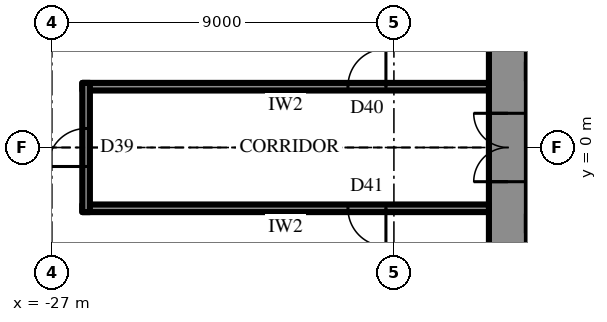
"""IFC4 building model, lengths in metres.
Left out: names, types, materials, properties, quantities, classifications, styles, units other than length and angle.
Written with IfcOpenShell. Run it as: python <this file> out.ifc"""

import sys

from ifc_helpers import new_model, si_unit, direction, frame, frame_2d, origin, place, context, subcontext, project, spatial, rectangle, extrude, element, fill, save


model = new_model("IFC4")
c1 = context("Model", 3, precision=1e-05, world=origin(), true_north=direction((0.0, 1.0)))
c2 = subcontext(c1, "Body", "Model", "MODEL_VIEW")
j1 = project(units=[si_unit("LENGTHUNIT", "METRE"), si_unit("PLANEANGLEUNIT", "RADIAN")], contexts=[c1])
p1 = place(None, origin())
s1 = spatial("IfcSite", under=j1, at=p1, CompositionType="ELEMENT")
p2 = place(p1, origin())
s2 = spatial("IfcBuilding", under=s1, at=p2, CompositionType="ELEMENT")
p3 = place(p2, frame((0.0, 0.0, 295.3)))
s3 = spatial("IfcBuildingStorey", under=s2, at=p3, CompositionType="ELEMENT", Elevation=295.3)
p4 = place(p3, frame((-15.0, 10.7, 0.0), z_axis=(0.0, 0.0, 1.0), x_axis=(0.0, -1.0, 0.0)))
e1 = element("IfcWall", 1, at=p4, inside=s3, PredefinedType="SHEAR", context=c2, shape_type="SweptSolid", body=[
    extrude(rectangle(XDim=21.4, YDim=1.0, at=frame_2d((10.7, 0.0))), origin(), (0.0, 0.0, 1.0), 4.2),
])
p5 = place(p4, frame((9.8, 0.0, 0.0)))
e2 = element("IfcOpeningElement", 2, at=p5, cuts=e1, PredefinedType="OPENING", context=c2, shape_type="SweptSolid", body=[
    extrude(rectangle(XDim=1.8, YDim=2.4, at=frame_2d((0.9, 1.2))), frame((0.0, 0.51, 0.0), z_axis=(0.0, -1.0, 0.0), x_axis=(1.0, 0.0, 0.0)), (0.0, 0.0, 1.0), 1.02),
])
p6 = place(p3, frame((-12.3, -2.0, 0.0), z_axis=(0.0, 0.0, 1.0), x_axis=(-1.0, 0.0, 0.0)))
e3 = element("IfcWall", 3, at=p6, inside=s3, PredefinedType="SHEAR", context=c2, shape_type="SweptSolid", body=[
    extrude(rectangle(XDim=2.2, YDim=0.5, at=frame_2d((1.1, 0.0))), origin(), (0.0, 0.0, 1.0), 4.2),
])
p7 = place(p6, frame((0.8, 0.0, 0.0)))
e4 = element("IfcOpeningElement", 4, at=p7, cuts=e3, PredefinedType="OPENING", context=c2, shape_type="SweptSolid", body=[
    extrude(rectangle(XDim=0.9, YDim=2.2, at=frame_2d((0.45, 1.1))), frame((0.0, 0.26, 0.0), z_axis=(0.0, -1.0, 0.0), x_axis=(1.0, 0.0, 0.0)), (0.0, 0.0, 1.0), 0.52),
])
p8 = place(p3, frame((-31.913, -2.425, 0.0), z_axis=(0.0, 0.0, 1.0), x_axis=(0.500001051461, -0.866024796723, 0.0)))
e5 = element("IfcWall", 5, at=p8, inside=s3, PredefinedType="SOLIDWALL", context=c2, shape_type="SweptSolid", body=[
    extrude(rectangle(XDim=27.713, YDim=0.3, at=frame_2d((13.856, 0.0))), origin(), (0.0, 0.0, 1.0), 1.9),
])
p9 = place(p8, frame((1.059, 0.0, 0.6)))
e6 = element("IfcOpeningElement", 6, at=p9, cuts=e5, PredefinedType="OPENING", context=c2, shape_type="SweptSolid", body=[
    extrude(rectangle(XDim=2.5, YDim=1.05, at=frame_2d((1.25, 0.525))), frame((0.0, 0.16, 0.0), z_axis=(0.0, -1.0, 0.0), x_axis=(1.0, 0.0, 0.0)), (0.0, 0.0, 1.0), 0.32),
])
p10 = place(p8, frame((5.678, 0.0, 0.6)))
e7 = element("IfcOpeningElement", 7, at=p10, cuts=e5, PredefinedType="OPENING", context=c2, shape_type="SweptSolid", body=[
    extrude(rectangle(XDim=2.5, YDim=1.05, at=frame_2d((1.25, 0.525))), frame((0.0, 0.16, 0.0), z_axis=(0.0, -1.0, 0.0), x_axis=(1.0, 0.0, 0.0)), (0.0, 0.0, 1.0), 0.32),
])
p11 = place(p8, frame((10.297, 0.0, 0.6)))
e8 = element("IfcOpeningElement", 8, at=p11, cuts=e5, PredefinedType="OPENING", context=c2, shape_type="SweptSolid", body=[
    extrude(rectangle(XDim=2.5, YDim=1.05, at=frame_2d((1.25, 0.525))), frame((0.0, 0.16, 0.0), z_axis=(0.0, -1.0, 0.0), x_axis=(1.0, 0.0, 0.0)), (0.0, 0.0, 1.0), 0.32),
])
p12 = place(p8, frame((14.916, 0.0, 0.6)))
e9 = element("IfcOpeningElement", 9, at=p12, cuts=e5, PredefinedType="OPENING", context=c2, shape_type="SweptSolid", body=[
    extrude(rectangle(XDim=2.5, YDim=1.05, at=frame_2d((1.25, 0.525))), frame((0.0, 0.16, 0.0), z_axis=(0.0, -1.0, 0.0), x_axis=(1.0, 0.0, 0.0)), (0.0, 0.0, 1.0), 0.32),
])
p13 = place(p8, frame((19.535, 0.0, 0.6)))
e10 = element("IfcOpeningElement", 10, at=p13, cuts=e5, PredefinedType="OPENING", context=c2, shape_type="SweptSolid", body=[
    extrude(rectangle(XDim=2.5, YDim=1.05, at=frame_2d((1.25, 0.525))), frame((0.0, 0.16, 0.0), z_axis=(0.0, -1.0, 0.0), x_axis=(1.0, 0.0, 0.0)), (0.0, 0.0, 1.0), 0.32),
])
p14 = place(p8, frame((24.153, 0.0, 0.6)))
e11 = element("IfcOpeningElement", 11, at=p14, cuts=e5, PredefinedType="OPENING", context=c2, shape_type="SweptSolid", body=[
    extrude(rectangle(XDim=2.5, YDim=1.05, at=frame_2d((1.25, 0.525))), frame((0.0, 0.16, 0.0), z_axis=(0.0, -1.0, 0.0), x_axis=(1.0, 0.0, 0.0)), (0.0, 0.0, 1.0), 0.32),
])
p15 = place(p3, frame((-15.5, 1.6, 0.0), z_axis=(0.0, 0.0, 1.0), x_axis=(-1.0, 0.0, 0.0)))
e12 = element("IfcWall", 12, at=p15, inside=s3, PredefinedType="PARTITIONING", context=c2, shape_type="SweptSolid", body=[
    extrude(rectangle(XDim=10.7, YDim=0.2, at=frame_2d((5.35, 0.0))), origin(), (0.0, 0.0, 1.0), 3.9),
])
p16 = place(p15, frame((2.71, 0.0, 0.0)))
e13 = element("IfcOpeningElement", 13, at=p16, cuts=e12, PredefinedType="OPENING", context=c2, shape_type="SweptSolid", body=[
    extrude(rectangle(XDim=1.0, YDim=2.2, at=frame_2d((0.5, 1.1))), frame((0.0, 0.11, 0.0), z_axis=(0.0, -1.0, 0.0), x_axis=(1.0, 0.0, 0.0)), (0.0, 0.0, 1.0), 0.22),
])
p17 = place(p3, frame((-15.5, -1.6, 0.0), z_axis=(0.0, 0.0, 1.0), x_axis=(-1.0, 0.0, 0.0)))
e14 = element("IfcWall", 14, at=p17, inside=s3, PredefinedType="PARTITIONING", context=c2, shape_type="SweptSolid", body=[
    extrude(rectangle(XDim=10.7, YDim=0.2, at=frame_2d((5.35, 0.0))), origin(), (0.0, 0.0, 1.0), 3.9),
])
p18 = place(p17, frame((2.71, 0.0, 0.0)))
e15 = element("IfcOpeningElement", 15, at=p18, cuts=e14, PredefinedType="OPENING", context=c2, shape_type="SweptSolid", body=[
    extrude(rectangle(XDim=1.0, YDim=2.2, at=frame_2d((0.5, 1.1))), frame((0.0, 0.11, 0.0), z_axis=(0.0, -1.0, 0.0), x_axis=(1.0, 0.0, 0.0)), (0.0, 0.0, 1.0), 0.22),
])
p19 = place(p3, frame((-26.1, -1.7, 0.0), z_axis=(0.0, 0.0, 1.0), x_axis=(0.0, 1.0, 0.0)))
e16 = element("IfcWall", 16, at=p19, inside=s3, PredefinedType="PARTITIONING", context=c2, shape_type="SweptSolid", body=[
    extrude(rectangle(XDim=3.4, YDim=0.2, at=frame_2d((1.7, 0.0))), origin(), (0.0, 0.0, 1.0), 3.9),
])
p20 = place(p19, frame((1.2, 0.0, 0.0)))
e17 = element("IfcOpeningElement", 17, at=p20, cuts=e16, PredefinedType="OPENING", context=c2, shape_type="SweptSolid", body=[
    extrude(rectangle(XDim=1.0, YDim=2.2, at=frame_2d((0.5, 1.1))), frame((0.0, 0.11, 0.0), z_axis=(0.0, -1.0, 0.0), x_axis=(1.0, 0.0, 0.0)), (0.0, 0.0, 1.0), 0.22),
])
p21 = place(p5, frame((1.8, 0.0, 0.0), z_axis=(0.0, 0.0, 1.0), x_axis=(-1.0, 0.0, 0.0)))
e18 = element("IfcDoor", 18, at=p21, inside=s3, OperationType="DOUBLE_DOOR_SINGLE_SWING", PredefinedType="DOOR", context=c2, shape_type="SweptSolid", body=[
    extrude(rectangle(XDim=1.8, YDim=2.4, at=frame_2d((0.9, 1.2))), frame((0.0, 0.025, 0.0), z_axis=(0.0, -1.0, 0.0), x_axis=(1.0, 0.0, 0.0)), (0.0, 0.0, 1.0), 0.05),
])
fill(e2, e18)
p22 = place(p16, frame((1.0, 0.0, 0.0), z_axis=(0.0, 0.0, 1.0), x_axis=(-1.0, 0.0, 0.0)))
e19 = element("IfcDoor", 19, at=p22, inside=s3, OperationType="SINGLE_SWING_LEFT", PredefinedType="DOOR", context=c2, shape_type="SweptSolid", body=[
    extrude(rectangle(XDim=1.0, YDim=2.2, at=frame_2d((0.5, 1.1))), frame((0.0, 0.025, 0.0), z_axis=(0.0, -1.0, 0.0), x_axis=(1.0, 0.0, 0.0)), (0.0, 0.0, 1.0), 0.05),
])
fill(e13, e19)
p23 = place(p18, origin())
e20 = element("IfcDoor", 20, at=p23, inside=s3, OperationType="SINGLE_SWING_RIGHT", PredefinedType="DOOR", context=c2, shape_type="SweptSolid", body=[
    extrude(rectangle(XDim=1.0, YDim=2.2, at=frame_2d((0.5, 1.1))), frame((0.0, 0.025, 0.0), z_axis=(0.0, -1.0, 0.0), x_axis=(1.0, 0.0, 0.0)), (0.0, 0.0, 1.0), 0.05),
])
fill(e15, e20)
p24 = place(p20, origin())
e21 = element("IfcDoor", 21, at=p24, inside=s3, OperationType="SINGLE_SWING_RIGHT", PredefinedType="DOOR", context=c2, shape_type="SweptSolid", body=[
    extrude(rectangle(XDim=1.0, YDim=2.2, at=frame_2d((0.5, 1.1))), frame((0.0, 0.025, 0.0), z_axis=(0.0, -1.0, 0.0), x_axis=(1.0, 0.0, 0.0)), (0.0, 0.0, 1.0), 0.05),
])
fill(e17, e21)
save(model, sys.argv[1])
